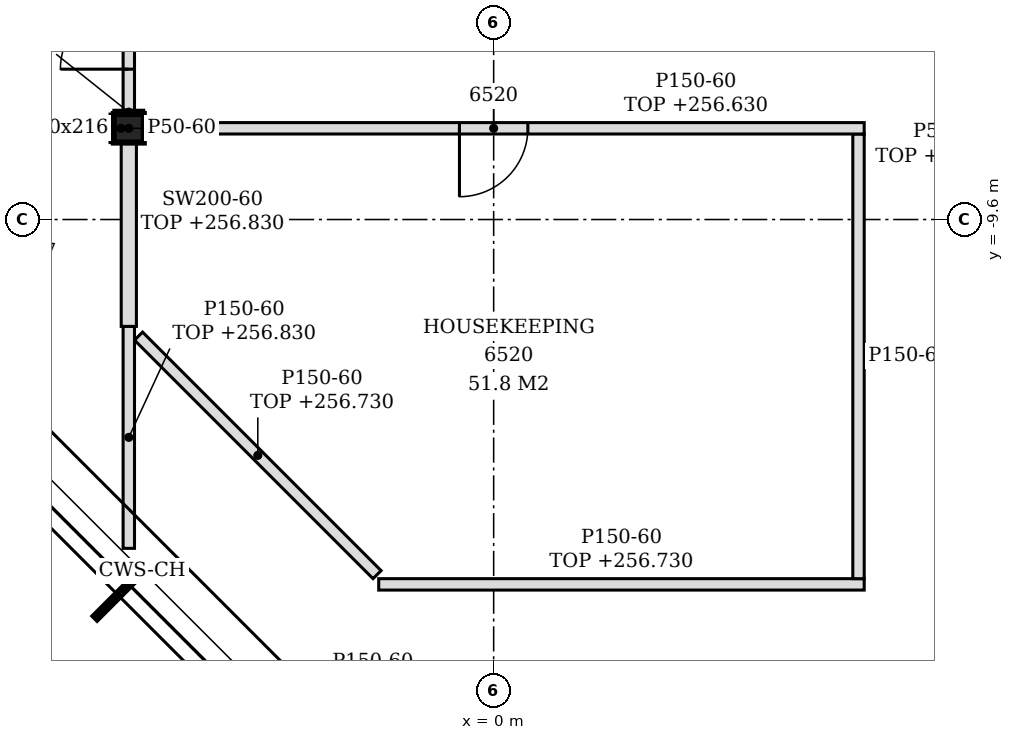
"""IFC4 building model, lengths in metres.
Left out: names, types, materials, properties, quantities, classifications, styles, units other than length and angle.
Written with IfcOpenShell. Run it as: python <this file> out.ifc"""

import sys

from ifc_helpers import new_model, si_unit, direction, frame, frame_2d, origin, origin_2d, place, context, subcontext, project, spatial, polyline, rectangle, i_section, outline, extrude, element, fill, save


model = new_model("IFC4")
c1 = context("Model", 3, precision=1e-05, world=origin(), true_north=direction((0.0, 1.0)))
c2 = subcontext(c1, "Body", "Model", "MODEL_VIEW")
j1 = project(units=[si_unit("LENGTHUNIT", "METRE"), si_unit("PLANEANGLEUNIT", "RADIAN")], contexts=[c1])
p1 = place(None, origin())
s1 = spatial("IfcSite", under=j1, at=p1, CompositionType="ELEMENT")
p2 = place(p1, origin())
s2 = spatial("IfcBuilding", under=s1, at=p2, CompositionType="ELEMENT")
p3 = place(p2, frame((0.0, 0.0, 253.8)))
s3 = spatial("IfcBuildingStorey", under=s2, at=p3, CompositionType="ELEMENT", Elevation=253.8)
p4 = place(p3, frame((-4.8, -8.4, -0.15), z_axis=(0.0, 0.0, 1.0), x_axis=(1.0, 0.0, 0.0)))
e1 = element("IfcColumn", 1, at=p4, inside=s3, PredefinedType="COLUMN", context=c2, shape_type="SweptSolid", body=[
    extrude(i_section(OverallWidth=0.394, OverallDepth=0.375, WebThickness=0.017, FlangeThickness=0.028, FilletRadius=0.015, at=origin_2d()), origin(), (0.0, 0.0, 1.0), 3.6),
])
p5 = place(p3, frame((-1.512, -14.4, 0.0), z_axis=(0.0, 0.0, 1.0), x_axis=(1.0, 0.0, 0.0)))
e2 = element("IfcWall", 2, at=p5, inside=s3, PredefinedType="PARTITIONING", context=c2, shape_type="SweptSolid", body=[
    extrude(rectangle(XDim=6.387, YDim=0.15, at=frame_2d((3.194, 0.0))), origin(), (0.0, 0.0, 1.0), 2.93),
])
p6 = place(p3, frame((-1.534, -14.272, 0.0), z_axis=(0.0, 0.0, 1.0), x_axis=(-0.707134287042, 0.707079274261, 0.0)))
e3 = element("IfcWall", 3, at=p6, inside=s3, PredefinedType="PARTITIONING", context=c2, shape_type="SweptSolid", body=[
    extrude(rectangle(XDim=4.438, YDim=0.15, at=frame_2d((2.219, 0.0))), origin(), (0.0, 0.0, 1.0), 2.93),
])
p7 = place(p3, frame((4.8, -14.325, 0.0), z_axis=(0.0, 0.0, 1.0), x_axis=(0.0, 1.0, 0.0)))
e4 = element("IfcWall", 4, at=p7, inside=s3, PredefinedType="PARTITIONING", context=c2, shape_type="SweptSolid", body=[
    extrude(outline(polyline([(0.0, 0.0), (5.85, 0.0), (5.85, 2.83), (5.775, 2.83), (5.773, 3.45), (0.025, 3.45), (0.023, 2.93), (0.0, 2.93), (0.0, 0.0)])), frame((0.0, 0.075, 0.0), z_axis=(0.0, -1.0, 0.0), x_axis=(1.0, 0.0, 0.0)), (0.0, 0.0, 1.0), 0.15),
])
p8 = place(p3, frame((-4.8, -13.926, 0.0), z_axis=(0.0, 0.0, 1.0), x_axis=(0.0, 1.0, 0.0)))
e5 = element("IfcWall", 5, at=p8, inside=s3, PredefinedType="PARTITIONING", context=c2, shape_type="SweptSolid", body=[
    extrude(outline(polyline([(0.0, 0.0), (2.92, 0.0), (2.92, 3.03), (1.369, 3.03), (1.367, 2.63), (0.229, 2.63), (0.227, 3.03), (0.0, 3.03), (0.0, 0.0)])), frame((0.0, 0.075, 0.0), z_axis=(0.0, -1.0, 0.0), x_axis=(1.0, 0.0, 0.0)), (0.0, 0.0, 1.0), 0.15),
])
p9 = place(p3, frame((-4.8, -11.006, 0.0), z_axis=(0.0, 0.0, 1.0), x_axis=(0.0, 1.0, 0.0)))
e6 = element("IfcWall", 6, at=p9, inside=s3, PredefinedType="PARTITIONING", context=c2, shape_type="SweptSolid", body=[
    extrude(rectangle(XDim=2.419, YDim=0.2, at=frame_2d((1.209, 0.0))), origin(), (0.0, 0.0, 1.0), 3.03),
])
p10 = place(p3, frame((-4.603, -8.4, 0.0), z_axis=(0.0, 0.0, 1.0), x_axis=(1.0, 0.0, 0.0)))
e7 = element("IfcWall", 7, at=p10, inside=s3, PredefinedType="PARTITIONING", context=c2, shape_type="SweptSolid", body=[
    extrude(rectangle(XDim=9.478, YDim=0.15, at=frame_2d((4.739, 0.0))), origin(), (0.0, 0.0, 1.0), 2.83),
])
p11 = place(p10, frame((4.153, 0.0, 0.0)))
e8 = element("IfcOpeningElement", 8, at=p11, cuts=e7, PredefinedType="OPENING", context=c2, shape_type="SweptSolid", body=[
    extrude(rectangle(XDim=0.9, YDim=2.1, at=frame_2d((0.45, 1.05))), frame((0.0, 0.085, 0.0), z_axis=(0.0, -1.0, 0.0), x_axis=(1.0, 0.0, 0.0)), (0.0, 0.0, 1.0), 0.17),
])
p12 = place(p3, frame((-4.8, -8.212, 0.0), z_axis=(0.0, 0.0, 1.0), x_axis=(0.0, 1.0, 0.0)))
e9 = element("IfcWall", 9, at=p12, inside=s3, PredefinedType="PARTITIONING", context=c2, shape_type="SweptSolid", body=[
    extrude(rectangle(XDim=10.425, YDim=0.15, at=frame_2d((5.212, 0.0))), origin(), (0.0, 0.0, 1.0), 2.83),
])
p13 = place(p12, frame((7.163, 0.0, 0.0)))
e10 = element("IfcOpeningElement", 10, at=p13, cuts=e9, PredefinedType="OPENING", context=c2, shape_type="SweptSolid", body=[
    extrude(rectangle(XDim=0.9, YDim=2.1, at=frame_2d((0.45, 1.05))), frame((0.0, 0.085, 0.0), z_axis=(0.0, -1.0, 0.0), x_axis=(1.0, 0.0, 0.0)), (0.0, 0.0, 1.0), 0.17),
])
p14 = place(p12, frame((0.591, 0.0, 0.0)))
e11 = element("IfcOpeningElement", 11, at=p14, cuts=e9, PredefinedType="OPENING", context=c2, shape_type="SweptSolid", body=[
    extrude(rectangle(XDim=0.9, YDim=2.1, at=frame_2d((0.45, 1.05))), frame((0.0, 0.085, 0.0), z_axis=(0.0, -1.0, 0.0), x_axis=(1.0, 0.0, 0.0)), (0.0, 0.0, 1.0), 0.17),
])
p15 = place(p3, frame((-5.022, -8.587, 0.0), z_axis=(0.0, 0.0, 1.0), x_axis=(0.0, 1.0, 0.0)))
e12 = element("IfcWall", 12, at=p15, inside=s3, PredefinedType="PARTITIONING", context=c2, shape_type="SweptSolid", body=[
    extrude(rectangle(XDim=0.375, YDim=0.05, at=frame_2d((0.188, 0.0))), origin(), (0.0, 0.0, 1.0), 3.45),
])
p16 = place(p3, frame((-4.997, -8.188, 0.0), z_axis=(0.0, 0.0, 1.0), x_axis=(1.0, 0.0, 0.0)))
e13 = element("IfcWall", 13, at=p16, inside=s3, PredefinedType="PARTITIONING", context=c2, shape_type="SweptSolid", body=[
    extrude(rectangle(XDim=0.394, YDim=0.05, at=frame_2d((0.197, 0.0))), origin(), (0.0, 0.0, 1.0), 2.83),
])
p17 = place(p14, origin())
e14 = element("IfcDoor", 14, at=p17, inside=s3, OperationType="SINGLE_SWING_LEFT", PredefinedType="DOOR", context=c2, shape_type="SweptSolid", body=[
    extrude(rectangle(XDim=0.9, YDim=2.1, at=frame_2d((0.45, 1.05))), frame((0.0, 0.025, 0.0), z_axis=(0.0, -1.0, 0.0), x_axis=(1.0, 0.0, 0.0)), (0.0, 0.0, 1.0), 0.05),
])
fill(e11, e14)
p18 = place(p11, frame((0.9, 0.0, 0.0), z_axis=(0.0, 0.0, 1.0), x_axis=(-1.0, 0.0, 0.0)))
e15 = element("IfcDoor", 15, at=p18, inside=s3, OperationType="SINGLE_SWING_RIGHT", PredefinedType="DOOR", context=c2, shape_type="SweptSolid", body=[
    extrude(rectangle(XDim=0.9, YDim=2.1, at=frame_2d((0.45, 1.05))), frame((0.0, 0.025, 0.0), z_axis=(0.0, -1.0, 0.0), x_axis=(1.0, 0.0, 0.0)), (0.0, 0.0, 1.0), 0.05),
])
fill(e8, e15)
save(model, sys.argv[1])
